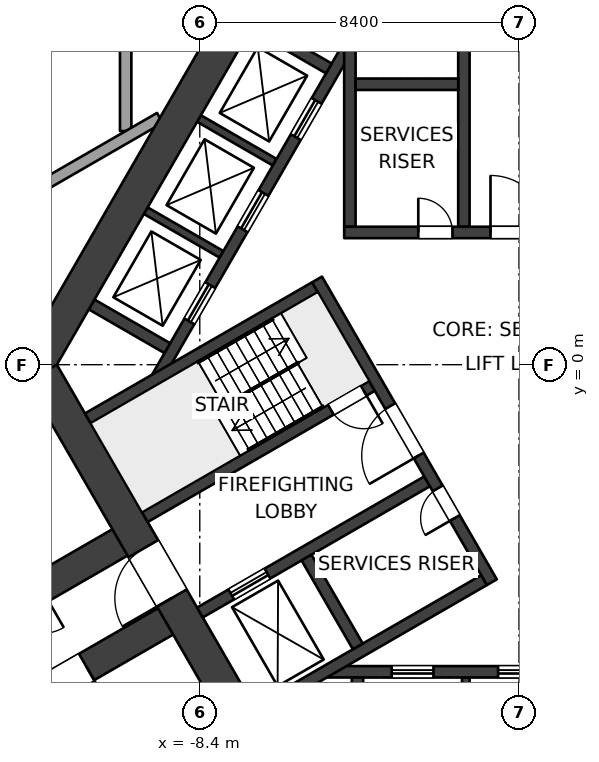
"""IFC4 building model, lengths in metres.
Left out: names, types, materials, properties, quantities, classifications, styles, units other than length and angle.
Written with IfcOpenShell. Run it as: python <this file> out.ifc"""

import sys

from ifc_helpers import new_model, si_unit, direction, frame, frame_2d, origin, place, context, subcontext, project, spatial, polyline, rectangle, outline, extrude, element, fill, save


model = new_model("IFC4")
c1 = context("Model", 3, precision=1e-05, world=origin(), true_north=direction((0.0, 1.0)))
c2 = subcontext(c1, "Body", "Model", "MODEL_VIEW")
j1 = project(units=[si_unit("LENGTHUNIT", "METRE"), si_unit("PLANEANGLEUNIT", "RADIAN")], contexts=[c1])
p1 = place(None, origin())
s1 = spatial("IfcSite", under=j1, at=p1, CompositionType="ELEMENT")
p2 = place(p1, origin())
s2 = spatial("IfcBuilding", under=s1, at=p2, CompositionType="ELEMENT")
p3 = place(p2, origin())
s3 = spatial("IfcBuildingStorey", under=s2, at=p3, CompositionType="ELEMENT", Elevation=0.0)
p4 = place(p3, frame((-6.47, -10.757, 0.0), z_axis=(0.0, 0.0, 1.0), x_axis=(-0.499997612506, 0.8660267822, 0.0)))
e1 = element("IfcWall", 1, at=p4, inside=s3, PredefinedType="SHEAR", context=c2, shape_type="SweptSolid", body=[
    extrude(rectangle(XDim=12.161, YDim=0.9, at=frame_2d((6.08, 0.0))), origin(), (0.0, 0.0, 1.0), 6.0),
])
p5 = place(p4, frame((5.33, 0.0, 0.0)))
e2 = element("IfcOpeningElement", 2, at=p5, cuts=e1, PredefinedType="OPENING", context=c2, shape_type="SweptSolid", body=[
    extrude(rectangle(XDim=1.5, YDim=2.1, at=frame_2d((0.75, 1.05))), frame((0.0, 0.46, 0.0), z_axis=(0.0, -1.0, 0.0), x_axis=(1.0, 0.0, 0.0)), (0.0, 0.0, 1.0), 0.92),
])
p6 = place(p3, origin())
e3 = element("IfcWall", 3, at=p6, inside=s3, PredefinedType="SHEAR", context=c2, shape_type="SweptSolid", body=[
    extrude(outline(polyline([(-6.6, 11.432), (-13.2, 0.0), (-12.94, -0.45), (-12.161, 0.0), (-6.08, 10.531), (-6.08, 11.432), (-6.6, 11.432)])), origin(), (0.0, 0.0, 1.0), 6.0),
])
p7 = place(p3, frame((-4.6, 3.48, 0.0), z_axis=(0.0, 0.0, 1.0), x_axis=(1.0, 0.0, 0.0)))
e4 = element("IfcWall", 4, at=p7, inside=s3, PredefinedType="SHEAR", context=c2, shape_type="SweptSolid", body=[
    extrude(rectangle(XDim=9.2, YDim=0.3, at=frame_2d((4.6, 0.0))), origin(), (0.0, 0.0, 1.0), 6.0),
])
p8 = place(p7, frame((3.85, 0.0, 0.0)))
e5 = element("IfcOpeningElement", 5, at=p8, cuts=e4, PredefinedType="OPENING", context=c2, shape_type="SweptSolid", body=[
    extrude(rectangle(XDim=1.5, YDim=2.1, at=frame_2d((0.75, 1.05))), frame((0.0, 0.16, 0.0), z_axis=(0.0, -1.0, 0.0), x_axis=(1.0, 0.0, 0.0)), (0.0, 0.0, 1.0), 0.32),
])
p9 = place(p7, frame((1.95, 0.0, 0.0)))
e6 = element("IfcOpeningElement", 6, at=p9, cuts=e4, PredefinedType="OPENING", context=c2, shape_type="SweptSolid", body=[
    extrude(rectangle(XDim=0.9, YDim=2.1, at=frame_2d((0.45, 1.05))), frame((0.0, 0.16, 0.0), z_axis=(0.0, -1.0, 0.0), x_axis=(1.0, 0.0, 0.0)), (0.0, 0.0, 1.0), 0.32),
])
p10 = place(p3, frame((-1.45, 3.63, 0.0), z_axis=(0.0, 0.0, 1.0), x_axis=(0.0, 1.0, 0.0)))
e7 = element("IfcWall", 7, at=p10, inside=s3, PredefinedType="SHEAR", context=c2, shape_type="SweptSolid", body=[
    extrude(rectangle(XDim=6.902, YDim=0.3, at=frame_2d((3.451, 0.0))), origin(), (0.0, 0.0, 1.0), 6.0),
])
p11 = place(p10, frame((4.85, 0.0, 0.0)))
e8 = element("IfcOpeningElement", 8, at=p11, cuts=e7, PredefinedType="OPENING", context=c2, shape_type="SweptSolid", body=[
    extrude(rectangle(XDim=1.1, YDim=2.1, at=frame_2d((0.55, 1.05))), frame((0.0, 0.16, 0.0), z_axis=(0.0, -1.0, 0.0), x_axis=(1.0, 0.0, 0.0)), (0.0, 0.0, 1.0), 0.32),
])
p12 = place(p3, frame((-4.45, 3.63, 0.0), z_axis=(0.0, 0.0, 1.0), x_axis=(0.0, 1.0, 0.0)))
e9 = element("IfcWall", 9, at=p12, inside=s3, PredefinedType="SHEAR", context=c2, shape_type="SweptSolid", body=[
    extrude(rectangle(XDim=6.902, YDim=0.3, at=frame_2d((3.451, 0.0))), origin(), (0.0, 0.0, 1.0), 6.0),
])
p13 = place(p3, frame((-4.3, 7.38, 0.0), z_axis=(0.0, 0.0, 1.0), x_axis=(1.0, 0.0, 0.0)))
e10 = element("IfcWall", 10, at=p13, inside=s3, PredefinedType="SHEAR", context=c2, shape_type="SweptSolid", body=[
    extrude(rectangle(XDim=2.7, YDim=0.3, at=frame_2d((1.35, 0.0))), origin(), (0.0, 0.0, 1.0), 6.0),
])
p14 = place(p3, frame((-0.714, -5.724, 0.0), z_axis=(0.0, 0.0, 1.0), x_axis=(-0.499995050369, 0.866028261437, 0.0)))
e11 = element("IfcWall", 11, at=p14, inside=s3, PredefinedType="SHEAR", context=c2, shape_type="SweptSolid", body=[
    extrude(rectangle(XDim=9.2, YDim=0.3, at=frame_2d((4.6, 0.0))), origin(), (0.0, 0.0, 1.0), 6.0),
])
p15 = place(p14, frame((3.85, 0.0, 0.0)))
e12 = element("IfcOpeningElement", 12, at=p15, cuts=e11, PredefinedType="OPENING", context=c2, shape_type="SweptSolid", body=[
    extrude(rectangle(XDim=1.5, YDim=2.1, at=frame_2d((0.75, 1.05))), frame((0.0, 0.16, 0.0), z_axis=(0.0, -1.0, 0.0), x_axis=(1.0, 0.0, 0.0)), (0.0, 0.0, 1.0), 0.32),
])
p16 = place(p14, frame((1.95, 0.0, 0.0)))
e13 = element("IfcOpeningElement", 13, at=p16, cuts=e11, PredefinedType="OPENING", context=c2, shape_type="SweptSolid", body=[
    extrude(rectangle(XDim=0.9, YDim=2.1, at=frame_2d((0.45, 1.05))), frame((0.0, 0.16, 0.0), z_axis=(0.0, -1.0, 0.0), x_axis=(1.0, 0.0, 0.0)), (0.0, 0.0, 1.0), 0.32),
])
p17 = place(p3, frame((-3.869, -0.559, 0.0), z_axis=(0.0, 0.0, 1.0), x_axis=(-0.86602711848, -0.499997030048, 0.0)))
e14 = element("IfcWall", 14, at=p17, inside=s3, PredefinedType="SHEAR", context=c2, shape_type="SweptSolid", body=[
    extrude(rectangle(XDim=6.901, YDim=0.3, at=frame_2d((3.451, 0.0))), origin(), (0.0, 0.0, 1.0), 6.0),
])
p18 = place(p17, frame((0.25, 0.0, 0.0)))
e15 = element("IfcOpeningElement", 15, at=p18, cuts=e14, PredefinedType="OPENING", context=c2, shape_type="SweptSolid", body=[
    extrude(rectangle(XDim=1.0, YDim=2.1, at=frame_2d((0.5, 1.05))), frame((0.0, 0.16, 0.0), z_axis=(0.0, -1.0, 0.0), x_axis=(1.0, 0.0, 0.0)), (0.0, 0.0, 1.0), 0.32),
])
p19 = place(p3, frame((-5.369, 2.039, 0.0), z_axis=(0.0, 0.0, 1.0), x_axis=(-0.86602711848, -0.499997030048, 0.0)))
e16 = element("IfcWall", 16, at=p19, inside=s3, PredefinedType="SHEAR", context=c2, shape_type="SweptSolid", body=[
    extrude(rectangle(XDim=6.901, YDim=0.3, at=frame_2d((3.451, 0.0))), origin(), (0.0, 0.0, 1.0), 6.0),
])
p20 = place(p3, frame((-2.419, -3.071, 0.0), z_axis=(0.0, 0.0, 1.0), x_axis=(-0.86602711848, -0.499997030048, 0.0)))
e17 = element("IfcWall", 17, at=p20, inside=s3, PredefinedType="SHEAR", context=c2, shape_type="SweptSolid", body=[
    extrude(rectangle(XDim=6.901, YDim=0.3, at=frame_2d((3.451, 0.0))), origin(), (0.0, 0.0, 1.0), 6.0),
])
p21 = place(p20, frame((4.85, 0.0, 0.0)))
e18 = element("IfcOpeningElement", 18, at=p21, cuts=e17, PredefinedType="OPENING", context=c2, shape_type="SweptSolid", body=[
    extrude(rectangle(XDim=1.1, YDim=2.1, at=frame_2d((0.55, 1.05))), frame((0.0, 0.16, 0.0), z_axis=(0.0, -1.0, 0.0), x_axis=(1.0, 0.0, 0.0)), (0.0, 0.0, 1.0), 0.32),
])
p22 = place(p3, frame((-0.919, -5.669, 0.0), z_axis=(0.0, 0.0, 1.0), x_axis=(-0.866011800373, -0.500023561059, 0.0)))
e19 = element("IfcWall", 19, at=p22, inside=s3, PredefinedType="SHEAR", context=c2, shape_type="SweptSolid", body=[
    extrude(rectangle(XDim=6.902, YDim=0.3, at=frame_2d((3.451, 0.0))), origin(), (0.0, 0.0, 1.0), 6.0),
])
p23 = place(p3, frame((-4.241, -7.414, 0.0), z_axis=(0.0, 0.0, 1.0), x_axis=(-0.500048589285, 0.86599734893, 0.0)))
e20 = element("IfcWall", 20, at=p23, inside=s3, PredefinedType="SHEAR", context=c2, shape_type="SweptSolid", body=[
    extrude(rectangle(XDim=2.7, YDim=0.3, at=frame_2d((1.35, 0.0))), origin(), (0.0, 0.0, 1.0), 6.0),
])
p24 = place(p3, frame((5.098, -8.082, 0.0), z_axis=(0.0, 0.0, 1.0), x_axis=(-1.0, 0.0, 0.0)))
e21 = element("IfcWall", 21, at=p24, inside=s3, PredefinedType="SHEAR", context=c2, shape_type="SweptSolid", body=[
    extrude(rectangle(XDim=10.195, YDim=0.3, at=frame_2d((5.098, 0.0))), origin(), (0.0, 0.0, 1.0), 6.0),
])
p25 = place(p24, frame((1.748, 0.0, 0.0)))
e22 = element("IfcOpeningElement", 22, at=p25, cuts=e21, PredefinedType="OPENING", context=c2, shape_type="SweptSolid", body=[
    extrude(rectangle(XDim=1.1, YDim=2.1, at=frame_2d((0.55, 1.05))), frame((0.0, 0.16, 0.0), z_axis=(0.0, -1.0, 0.0), x_axis=(1.0, 0.0, 0.0)), (0.0, 0.0, 1.0), 0.32),
])
p26 = place(p24, frame((4.548, 0.0, 0.0)))
e23 = element("IfcOpeningElement", 23, at=p26, cuts=e21, PredefinedType="OPENING", context=c2, shape_type="SweptSolid", body=[
    extrude(rectangle(XDim=1.1, YDim=2.1, at=frame_2d((0.55, 1.05))), frame((0.0, 0.16, 0.0), z_axis=(0.0, -1.0, 0.0), x_axis=(1.0, 0.0, 0.0)), (0.0, 0.0, 1.0), 0.32),
])
p27 = place(p24, frame((7.348, 0.0, 0.0)))
e24 = element("IfcOpeningElement", 24, at=p27, cuts=e21, PredefinedType="OPENING", context=c2, shape_type="SweptSolid", body=[
    extrude(rectangle(XDim=1.1, YDim=2.1, at=frame_2d((0.55, 1.05))), frame((0.0, 0.16, 0.0), z_axis=(0.0, -1.0, 0.0), x_axis=(1.0, 0.0, 0.0)), (0.0, 0.0, 1.0), 0.32),
])
p28 = place(p3, frame((-4.25, -8.231, 0.0), z_axis=(0.0, 0.0, 1.0), x_axis=(0.0, -1.0, 0.0)))
e25 = element("IfcWall", 25, at=p28, inside=s3, PredefinedType="SHEAR", context=c2, shape_type="SweptSolid", body=[
    extrude(rectangle(XDim=2.3, YDim=0.3, at=frame_2d((1.15, 0.0))), origin(), (0.0, 0.0, 1.0), 6.0),
])
p29 = place(p3, frame((-1.4, -8.231, 0.0), z_axis=(0.0, 0.0, 1.0), x_axis=(0.0, -1.0, 0.0)))
e26 = element("IfcWall", 26, at=p29, inside=s3, PredefinedType="SHEAR", context=c2, shape_type="SweptSolid", body=[
    extrude(rectangle(XDim=2.3, YDim=0.2, at=frame_2d((1.15, 0.0))), origin(), (0.0, 0.0, 1.0), 6.0),
])
p30 = place(p3, frame((-9.548, -0.374, 0.0), z_axis=(0.0, 0.0, 1.0), x_axis=(0.500002290144, 0.866024081565, 0.0)))
e27 = element("IfcWall", 27, at=p30, inside=s3, PredefinedType="SHEAR", context=c2, shape_type="SweptSolid", body=[
    extrude(rectangle(XDim=10.195, YDim=0.3, at=frame_2d((5.098, 0.0))), origin(), (0.0, 0.0, 1.0), 6.0),
])
p31 = place(p30, frame((1.748, 0.0, 0.0)))
e28 = element("IfcOpeningElement", 28, at=p31, cuts=e27, PredefinedType="OPENING", context=c2, shape_type="SweptSolid", body=[
    extrude(rectangle(XDim=1.1, YDim=2.1, at=frame_2d((0.55, 1.05))), frame((0.0, 0.16, 0.0), z_axis=(0.0, -1.0, 0.0), x_axis=(1.0, 0.0, 0.0)), (0.0, 0.0, 1.0), 0.32),
])
p32 = place(p30, frame((4.548, 0.0, 0.0)))
e29 = element("IfcOpeningElement", 29, at=p32, cuts=e27, PredefinedType="OPENING", context=c2, shape_type="SweptSolid", body=[
    extrude(rectangle(XDim=1.1, YDim=2.1, at=frame_2d((0.55, 1.05))), frame((0.0, 0.16, 0.0), z_axis=(0.0, -1.0, 0.0), x_axis=(1.0, 0.0, 0.0)), (0.0, 0.0, 1.0), 0.32),
])
p33 = place(p30, frame((7.348, 0.0, 0.0)))
e30 = element("IfcOpeningElement", 30, at=p33, cuts=e27, PredefinedType="OPENING", context=c2, shape_type="SweptSolid", body=[
    extrude(rectangle(XDim=1.1, YDim=2.1, at=frame_2d((0.55, 1.05))), frame((0.0, 0.16, 0.0), z_axis=(0.0, -1.0, 0.0), x_axis=(1.0, 0.0, 0.0)), (0.0, 0.0, 1.0), 0.32),
])
for number, where, z_axis, x_axis in (
    (31, (-9.254, 0.435, 0.0), (0.0, 0.0, 1.0), (-0.866, 0.5, 0.0)),
    (32, (-5.004, 7.796, 0.0), (0.0, 0.0, 1.0), (-0.866, 0.5, 0.0)),
):
    element("IfcWall", number, at=place(p3, frame(where, z_axis=z_axis, x_axis=x_axis)), inside=s3, PredefinedType="SHEAR", context=c2, shape_type="SweptSolid", body=[
        extrude(rectangle(XDim=2.3, YDim=0.3, at=frame_2d((1.15, 0.0))), origin(), (0.0, 0.0, 1.0), 6.0),
    ])
for number, where, z_axis, x_axis in (
    (33, (-7.829, 2.903, 0.0), (0.0, 0.0, 1.0), (-0.866, 0.5, 0.0)),
    (34, (-6.429, 5.328, 0.0), (0.0, 0.0, 1.0), (-0.866, 0.5, 0.0)),
):
    element("IfcWall", number, at=place(p3, frame(where, z_axis=z_axis, x_axis=x_axis)), inside=s3, PredefinedType="SHEAR", context=c2, shape_type="SweptSolid", body=[
        extrude(rectangle(XDim=2.3, YDim=0.2, at=frame_2d((1.15, 0.0))), origin(), (0.0, 0.0, 1.0), 6.0),
    ])
p34 = place(p3, frame((-8.91, -6.53, 0.0), z_axis=(0.0, 0.0, 1.0), x_axis=(-0.866025284237, -0.500000207062, 0.0)))
e35 = element("IfcWall", 35, at=p34, inside=s3, PredefinedType="SHEAR", context=c2, shape_type="SweptSolid", body=[
    extrude(rectangle(XDim=36.75, YDim=0.8, at=frame_2d((18.375, 0.0))), origin(), (0.0, 0.0, 1.0), 6.0),
])
p35 = place(p34, frame((2.85, 0.0, 0.0)))
e36 = element("IfcOpeningElement", 36, at=p35, cuts=e35, PredefinedType="OPENING", context=c2, shape_type="SweptSolid", body=[
    extrude(rectangle(XDim=1.2, YDim=2.1, at=frame_2d((0.6, 1.05))), frame((0.0, 0.41, 0.0), z_axis=(0.0, -1.0, 0.0), x_axis=(1.0, 0.0, 0.0)), (0.0, 0.0, 1.0), 0.82),
])
p36 = place(p3, frame((-10.11, -4.451, 0.0), z_axis=(0.0, 0.0, 1.0), x_axis=(-0.866025284237, -0.500000207062, 0.0)))
e37 = element("IfcWall", 37, at=p36, inside=s3, PredefinedType="SHEAR", context=c2, shape_type="SweptSolid", body=[
    extrude(rectangle(XDim=36.75, YDim=0.8, at=frame_2d((18.375, 0.0))), origin(), (0.0, 0.0, 1.0), 6.0),
])
p37 = place(p36, frame((10.0, 0.0, 0.0)))
e38 = element("IfcOpeningElement", 38, at=p37, cuts=e37, PredefinedType="OPENING", context=c2, shape_type="SweptSolid", body=[
    extrude(rectangle(XDim=1.0, YDim=2.1, at=frame_2d((0.5, 1.05))), frame((0.0, 0.41, 0.0), z_axis=(0.0, -1.0, 0.0), x_axis=(1.0, 0.0, 0.0)), (0.0, 0.0, 1.0), 0.82),
])
p38 = place(p36, frame((2.85, 0.0, 0.0)))
e39 = element("IfcOpeningElement", 39, at=p38, cuts=e37, PredefinedType="OPENING", context=c2, shape_type="SweptSolid", body=[
    extrude(rectangle(XDim=1.2, YDim=2.1, at=frame_2d((0.6, 1.05))), frame((0.0, 0.41, 0.0), z_axis=(0.0, -1.0, 0.0), x_axis=(1.0, 0.0, 0.0)), (0.0, 0.0, 1.0), 0.82),
])
p39 = place(p3, frame((-10.35, 6.149, 0.0), z_axis=(0.0, 0.0, 1.0), x_axis=(0.0, 1.0, 0.0)))
e40 = element("IfcWall", 40, at=p39, inside=s3, PredefinedType="SOLIDWALL", context=c2, shape_type="SweptSolid", body=[
    extrude(rectangle(XDim=41.883, YDim=0.3, at=frame_2d((20.941, 0.0))), origin(), (0.0, 0.0, 1.0), 5.7),
])
p40 = place(p39, frame((25.383, 0.0, 0.0)))
e41 = element("IfcOpeningElement", 41, at=p40, cuts=e40, PredefinedType="OPENING", context=c2, shape_type="SweptSolid", body=[
    extrude(rectangle(XDim=1.8, YDim=2.4, at=frame_2d((0.9, 1.2))), frame((0.0, 0.16, 0.0), z_axis=(0.0, -1.0, 0.0), x_axis=(1.0, 0.0, 0.0)), (0.0, 0.0, 1.0), 0.32),
])
p41 = place(p3, frame((-9.45, 6.495, 0.0), z_axis=(0.0, 0.0, 1.0), x_axis=(-0.866025301493, -0.500000177174, 0.0)))
e42 = element("IfcWall", 42, at=p41, inside=s3, PredefinedType="SOLIDWALL", context=c2, shape_type="SweptSolid", body=[
    extrude(rectangle(XDim=43.095, YDim=0.3, at=frame_2d((21.548, 0.0))), origin(), (0.0, 0.0, 1.0), 5.7),
])
p42 = place(p41, frame((26.595, 0.0, 0.0)))
e43 = element("IfcOpeningElement", 43, at=p42, cuts=e42, PredefinedType="OPENING", context=c2, shape_type="SweptSolid", body=[
    extrude(rectangle(XDim=1.8, YDim=2.4, at=frame_2d((0.9, 1.2))), frame((0.0, 0.16, 0.0), z_axis=(0.0, -1.0, 0.0), x_axis=(1.0, 0.0, 0.0)), (0.0, 0.0, 1.0), 0.32),
])
p43 = place(p26, origin())
e44 = element("IfcDoor", 44, at=p43, inside=s3, OperationType="DOUBLE_DOOR_SLIDING", PredefinedType="DOOR", context=c2, shape_type="SweptSolid", body=[
    extrude(rectangle(XDim=1.1, YDim=2.1, at=frame_2d((0.55, 1.05))), frame((0.0, 0.025, 0.0), z_axis=(0.0, -1.0, 0.0), x_axis=(1.0, 0.0, 0.0)), (0.0, 0.0, 1.0), 0.05),
])
fill(e23, e44)
p44 = place(p27, origin())
e45 = element("IfcDoor", 45, at=p44, inside=s3, OperationType="DOUBLE_DOOR_SLIDING", PredefinedType="DOOR", context=c2, shape_type="SweptSolid", body=[
    extrude(rectangle(XDim=1.1, YDim=2.1, at=frame_2d((0.55, 1.05))), frame((0.0, 0.025, 0.0), z_axis=(0.0, -1.0, 0.0), x_axis=(1.0, 0.0, 0.0)), (0.0, 0.0, 1.0), 0.05),
])
fill(e24, e45)
p45 = place(p31, origin())
e46 = element("IfcDoor", 46, at=p45, inside=s3, OperationType="DOUBLE_DOOR_SLIDING", PredefinedType="DOOR", context=c2, shape_type="SweptSolid", body=[
    extrude(rectangle(XDim=1.1, YDim=2.1, at=frame_2d((0.55, 1.05))), frame((0.0, 0.025, 0.0), z_axis=(0.0, -1.0, 0.0), x_axis=(1.0, 0.0, 0.0)), (0.0, 0.0, 1.0), 0.05),
])
fill(e28, e46)
p46 = place(p32, origin())
e47 = element("IfcDoor", 47, at=p46, inside=s3, OperationType="DOUBLE_DOOR_SLIDING", PredefinedType="DOOR", context=c2, shape_type="SweptSolid", body=[
    extrude(rectangle(XDim=1.1, YDim=2.1, at=frame_2d((0.55, 1.05))), frame((0.0, 0.025, 0.0), z_axis=(0.0, -1.0, 0.0), x_axis=(1.0, 0.0, 0.0)), (0.0, 0.0, 1.0), 0.05),
])
fill(e29, e47)
p47 = place(p33, origin())
e48 = element("IfcDoor", 48, at=p47, inside=s3, OperationType="DOUBLE_DOOR_SLIDING", PredefinedType="DOOR", context=c2, shape_type="SweptSolid", body=[
    extrude(rectangle(XDim=1.1, YDim=2.1, at=frame_2d((0.55, 1.05))), frame((0.0, 0.025, 0.0), z_axis=(0.0, -1.0, 0.0), x_axis=(1.0, 0.0, 0.0)), (0.0, 0.0, 1.0), 0.05),
])
fill(e30, e48)
p48 = place(p21, origin())
e49 = element("IfcDoor", 49, at=p48, inside=s3, OperationType="DOUBLE_DOOR_SLIDING", PredefinedType="DOOR", context=c2, shape_type="SweptSolid", body=[
    extrude(rectangle(XDim=1.1, YDim=2.1, at=frame_2d((0.55, 1.05))), frame((0.0, 0.025, 0.0), z_axis=(0.0, -1.0, 0.0), x_axis=(1.0, 0.0, 0.0)), (0.0, 0.0, 1.0), 0.05),
])
fill(e18, e49)
p49 = place(p8, origin())
e50 = element("IfcDoor", 50, at=p49, inside=s3, OperationType="DOUBLE_DOOR_DOUBLE_SWING", PredefinedType="DOOR", context=c2, shape_type="SweptSolid", body=[
    extrude(rectangle(XDim=1.5, YDim=2.1, at=frame_2d((0.75, 1.05))), frame((0.0, 0.025, 0.0), z_axis=(0.0, -1.0, 0.0), x_axis=(1.0, 0.0, 0.0)), (0.0, 0.0, 1.0), 0.05),
])
fill(e5, e50)
p50 = place(p9, origin())
e51 = element("IfcDoor", 51, at=p50, inside=s3, OperationType="SINGLE_SWING_LEFT", PredefinedType="DOOR", context=c2, shape_type="SweptSolid", body=[
    extrude(rectangle(XDim=0.9, YDim=2.1, at=frame_2d((0.45, 1.05))), frame((0.0, 0.025, 0.0), z_axis=(0.0, -1.0, 0.0), x_axis=(1.0, 0.0, 0.0)), (0.0, 0.0, 1.0), 0.05),
])
fill(e6, e51)
p51 = place(p15, origin())
e52 = element("IfcDoor", 52, at=p51, inside=s3, OperationType="DOUBLE_DOOR_DOUBLE_SWING", PredefinedType="DOOR", context=c2, shape_type="SweptSolid", body=[
    extrude(rectangle(XDim=1.5, YDim=2.1, at=frame_2d((0.75, 1.05))), frame((0.0, 0.025, 0.0), z_axis=(0.0, -1.0, 0.0), x_axis=(1.0, 0.0, 0.0)), (0.0, 0.0, 1.0), 0.05),
])
fill(e12, e52)
p52 = place(p16, origin())
e53 = element("IfcDoor", 53, at=p52, inside=s3, OperationType="SINGLE_SWING_LEFT", PredefinedType="DOOR", context=c2, shape_type="SweptSolid", body=[
    extrude(rectangle(XDim=0.9, YDim=2.1, at=frame_2d((0.45, 1.05))), frame((0.0, 0.025, 0.0), z_axis=(0.0, -1.0, 0.0), x_axis=(1.0, 0.0, 0.0)), (0.0, 0.0, 1.0), 0.05),
])
fill(e13, e53)
p53 = place(p18, origin())
e54 = element("IfcDoor", 54, at=p53, inside=s3, OperationType="SINGLE_SWING_LEFT", PredefinedType="DOOR", context=c2, shape_type="SweptSolid", body=[
    extrude(rectangle(XDim=1.0, YDim=2.1, at=frame_2d((0.5, 1.05))), frame((0.0, 0.025, 0.0), z_axis=(0.0, -1.0, 0.0), x_axis=(1.0, 0.0, 0.0)), (0.0, 0.0, 1.0), 0.05),
])
fill(e15, e54)
p54 = place(p5, origin())
e55 = element("IfcDoor", 55, at=p54, inside=s3, OperationType="DOUBLE_DOOR_DOUBLE_SWING", PredefinedType="DOOR", context=c2, shape_type="SweptSolid", body=[
    extrude(rectangle(XDim=1.5, YDim=2.1, at=frame_2d((0.75, 1.05))), frame((0.0, 0.025, 0.0), z_axis=(0.0, -1.0, 0.0), x_axis=(1.0, 0.0, 0.0)), (0.0, 0.0, 1.0), 0.05),
])
fill(e2, e55)
p55 = place(p35, origin())
e56 = element("IfcDoor", 56, at=p55, inside=s3, OperationType="DOUBLE_SWING_LEFT", PredefinedType="DOOR", context=c2, shape_type="SweptSolid", body=[
    extrude(rectangle(XDim=1.2, YDim=2.1, at=frame_2d((0.6, 1.05))), frame((0.0, 0.025, 0.0), z_axis=(0.0, -1.0, 0.0), x_axis=(1.0, 0.0, 0.0)), (0.0, 0.0, 1.0), 0.05),
])
fill(e36, e56)
save(model, sys.argv[1])
